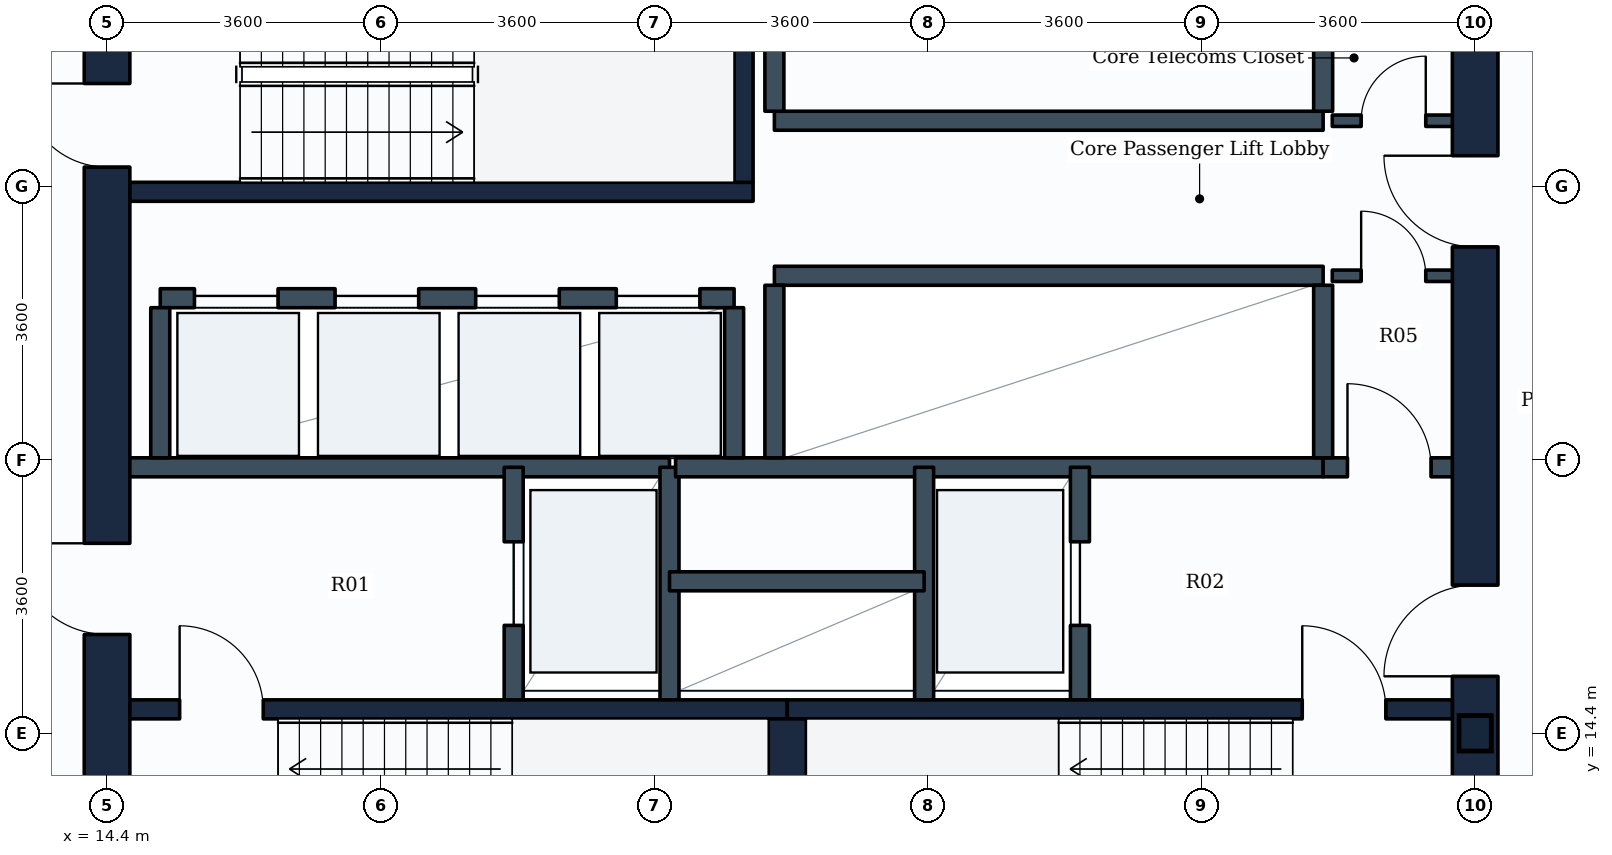
"""IFC4 building model, lengths in metres.
Left out: names, types, materials, properties, quantities, classifications, styles, units other than length and angle.
Written with IfcOpenShell. Run it as: python <this file> out.ifc"""

import sys

from ifc_helpers import new_model, si_unit, direction, frame, frame_2d, origin, origin_2d, place, context, subcontext, project, spatial, rectangle, i_section, extrude, element, fill, save


model = new_model("IFC4")
c1 = context("Model", 3, precision=1e-05, world=origin(), true_north=direction((0.0, 1.0)))
c2 = subcontext(c1, "Body", "Model", "MODEL_VIEW")
j1 = project(units=[si_unit("LENGTHUNIT", "METRE"), si_unit("PLANEANGLEUNIT", "RADIAN")], contexts=[c1])
p1 = place(None, origin())
s1 = spatial("IfcSite", under=j1, at=p1, CompositionType="ELEMENT")
p2 = place(p1, origin())
s2 = spatial("IfcBuilding", under=s1, at=p2, CompositionType="ELEMENT")
p3 = place(p2, frame((0.0, 0.0, 87.9)))
s3 = spatial("IfcBuildingStorey", under=s2, at=p3, CompositionType="ELEMENT", Elevation=87.9)
p4 = place(p3, frame((32.4, 14.4, 0.0), z_axis=(0.0, 0.0, 1.0), x_axis=(1.0, 0.0, 0.0)))
e1 = element("IfcColumn", 1, at=p4, inside=s3, PredefinedType="COLUMN", context=c2, shape_type="SweptSolid", body=[
    extrude(i_section(OverallWidth=0.424, OverallDepth=0.467, WebThickness=0.033, FlangeThickness=0.053, FilletRadius=0.015, at=origin_2d()), origin(), (0.0, 0.0, 1.0), 3.9),
])
p5 = place(p3, frame((14.4, 10.8, 0.0), z_axis=(0.0, 0.0, 1.0), x_axis=(0.0, 1.0, 0.0)))
e2 = element("IfcWall", 2, at=p5, inside=s3, PredefinedType="SHEAR", context=c2, shape_type="SweptSolid", body=[
    extrude(rectangle(XDim=14.4, YDim=0.6, at=frame_2d((7.2, 0.0))), origin(), (0.0, 0.0, 1.0), 3.65),
])
p6 = place(p5, frame((11.05, 0.0, 0.0)))
e3 = element("IfcOpeningElement", 3, at=p6, cuts=e2, PredefinedType="OPENING", context=c2, shape_type="SweptSolid", body=[
    extrude(rectangle(XDim=1.1, YDim=2.1, at=frame_2d((0.55, 1.05))), frame((0.0, 0.31, 0.0), z_axis=(0.0, -1.0, 0.0), x_axis=(1.0, 0.0, 0.0)), (0.0, 0.0, 1.0), 0.62),
])
p7 = place(p5, frame((4.9, 0.0, 0.0)))
e4 = element("IfcOpeningElement", 4, at=p7, cuts=e2, PredefinedType="OPENING", context=c2, shape_type="SweptSolid", body=[
    extrude(rectangle(XDim=1.2, YDim=2.1, at=frame_2d((0.6, 1.05))), frame((0.0, 0.31, 0.0), z_axis=(0.0, -1.0, 0.0), x_axis=(1.0, 0.0, 0.0)), (0.0, 0.0, 1.0), 0.62),
])
p8 = place(p3, frame((32.4, 10.8, 0.0), z_axis=(0.0, 0.0, 1.0), x_axis=(0.0, 1.0, 0.0)))
e5 = element("IfcWall", 5, at=p8, inside=s3, PredefinedType="SHEAR", context=c2, shape_type="SweptSolid", body=[
    extrude(rectangle(XDim=14.4, YDim=0.6, at=frame_2d((7.2, 0.0))), origin(), (0.0, 0.0, 1.0), 3.65),
])
p9 = place(p8, frame((4.35, 0.0, 0.0)))
e6 = element("IfcOpeningElement", 6, at=p9, cuts=e5, PredefinedType="OPENING", context=c2, shape_type="SweptSolid", body=[
    extrude(rectangle(XDim=1.2, YDim=2.1, at=frame_2d((0.6, 1.05))), frame((0.0, 0.31, 0.0), z_axis=(0.0, -1.0, 0.0), x_axis=(1.0, 0.0, 0.0)), (0.0, 0.0, 1.0), 0.62),
])
p10 = place(p8, frame((10.0, 0.0, 0.0)))
e7 = element("IfcOpeningElement", 7, at=p10, cuts=e5, PredefinedType="OPENING", context=c2, shape_type="SweptSolid", body=[
    extrude(rectangle(XDim=1.2, YDim=2.1, at=frame_2d((0.6, 1.05))), frame((0.0, 0.31, 0.0), z_axis=(0.0, -1.0, 0.0), x_axis=(1.0, 0.0, 0.0)), (0.0, 0.0, 1.0), 0.62),
])
p11 = place(p3, frame((14.7, 14.715, 0.0), z_axis=(0.0, 0.0, 1.0), x_axis=(1.0, 0.0, 0.0)))
e8 = element("IfcWall", 8, at=p11, inside=s3, PredefinedType="SHEAR", context=c2, shape_type="SweptSolid", body=[
    extrude(rectangle(XDim=8.65, YDim=0.25, at=frame_2d((4.325, 0.0))), origin(), (0.0, 0.0, 1.0), 3.65),
])
p12 = place(p11, frame((0.655, 0.0, 0.0)))
e9 = element("IfcOpeningElement", 9, at=p12, cuts=e8, PredefinedType="OPENING", context=c2, shape_type="SweptSolid", body=[
    extrude(rectangle(XDim=1.1, YDim=2.1, at=frame_2d((0.55, 1.05))), frame((0.0, 0.135, 0.0), z_axis=(0.0, -1.0, 0.0), x_axis=(1.0, 0.0, 0.0)), (0.0, 0.0, 1.0), 0.27),
])
p13 = place(p3, frame((23.35, 14.715, 0.0), z_axis=(0.0, 0.0, 1.0), x_axis=(1.0, 0.0, 0.0)))
e10 = element("IfcWall", 10, at=p13, inside=s3, PredefinedType="SHEAR", context=c2, shape_type="SweptSolid", body=[
    extrude(rectangle(XDim=8.75, YDim=0.25, at=frame_2d((4.375, 0.0))), origin(), (0.0, 0.0, 1.0), 3.65),
])
p14 = place(p13, frame((6.775, 0.0, 0.0)))
e11 = element("IfcOpeningElement", 11, at=p14, cuts=e10, PredefinedType="OPENING", context=c2, shape_type="SweptSolid", body=[
    extrude(rectangle(XDim=1.1, YDim=2.1, at=frame_2d((0.55, 1.05))), frame((0.0, 0.135, 0.0), z_axis=(0.0, -1.0, 0.0), x_axis=(1.0, 0.0, 0.0)), (0.0, 0.0, 1.0), 0.27),
])
p15 = place(p3, frame((23.35, 11.75, 0.0), z_axis=(0.0, 0.0, 1.0), x_axis=(0.0, 1.0, 0.0)))
e12 = element("IfcWall", 12, at=p15, inside=s3, PredefinedType="SHEAR", context=c2, shape_type="SweptSolid", body=[
    extrude(rectangle(XDim=2.84, YDim=0.5, at=frame_2d((1.42, 0.0))), origin(), (0.0, 0.0, 1.0), 3.65),
])
p16 = place(p3, frame((14.7, 21.525, 0.0), z_axis=(0.0, 0.0, 1.0), x_axis=(1.0, 0.0, 0.0)))
e13 = element("IfcWall", 13, at=p16, inside=s3, PredefinedType="SHEAR", context=c2, shape_type="SweptSolid", body=[
    extrude(rectangle(XDim=8.2, YDim=0.25, at=frame_2d((4.1, 0.0))), origin(), (0.0, 0.0, 1.0), 3.65),
])
p17 = place(p3, frame((22.775, 21.65, 0.0), z_axis=(0.0, 0.0, 1.0), x_axis=(0.0, 1.0, 0.0)))
e14 = element("IfcWall", 14, at=p17, inside=s3, PredefinedType="SHEAR", context=c2, shape_type="SweptSolid", body=[
    extrude(rectangle(XDim=2.84, YDim=0.25, at=frame_2d((1.42, 0.0))), origin(), (0.0, 0.0, 1.0), 3.65),
])
p18 = place(p3, frame((14.65, 17.9, 0.0), z_axis=(0.0, 0.0, 1.0), x_axis=(1.0, 0.0, 0.0)))
e15 = element("IfcWall", 15, at=p18, inside=s3, PredefinedType="PARTITIONING", context=c2, shape_type="SweptSolid", body=[
    extrude(rectangle(XDim=7.15, YDim=0.25, at=frame_2d((3.575, 0.0))), origin(), (0.0, 0.0, 1.0), 3.635),
])
p19 = place(p3, frame((19.75, 14.84, 0.0), z_axis=(0.0, 0.0, 1.0), x_axis=(0.0, 1.0, 0.0)))
e16 = element("IfcWall", 16, at=p19, inside=s3, PredefinedType="PARTITIONING", context=c2, shape_type="SweptSolid", body=[
    extrude(rectangle(XDim=3.06, YDim=0.25, at=frame_2d((1.53, 0.0))), origin(), (0.0, 0.0, 1.0), 3.635),
])
p20 = place(p19, frame((0.98, 0.0, 0.0)))
e17 = element("IfcOpeningElement", 17, at=p20, cuts=e16, PredefinedType="OPENING", context=c2, shape_type="SweptSolid", body=[
    extrude(rectangle(XDim=1.1, YDim=2.1, at=frame_2d((0.55, 1.05))), frame((0.0, 0.135, 0.0), z_axis=(0.0, -1.0, 0.0), x_axis=(1.0, 0.0, 0.0)), (0.0, 0.0, 1.0), 0.27),
])
p21 = place(p3, frame((21.8, 14.84, 0.0), z_axis=(0.0, 0.0, 1.0), x_axis=(0.0, 1.0, 0.0)))
e18 = element("IfcWall", 18, at=p21, inside=s3, PredefinedType="PARTITIONING", context=c2, shape_type="SweptSolid", body=[
    extrude(rectangle(XDim=3.06, YDim=0.25, at=frame_2d((1.53, 0.0))), origin(), (0.0, 0.0, 1.0), 3.635),
])
p22 = place(p3, frame((21.88, 17.9, 0.0), z_axis=(0.0, 0.0, 1.0), x_axis=(1.0, 0.0, 0.0)))
e19 = element("IfcWall", 19, at=p22, inside=s3, PredefinedType="PARTITIONING", context=c2, shape_type="SweptSolid", body=[
    extrude(rectangle(XDim=8.52, YDim=0.25, at=frame_2d((4.26, 0.0))), origin(), (0.0, 0.0, 1.0), 3.635),
])
p23 = place(p3, frame((30.4, 17.9, 0.0), z_axis=(0.0, 0.0, 1.0), x_axis=(1.0, 0.0, 0.0)))
e20 = element("IfcWall", 20, at=p23, inside=s3, PredefinedType="PARTITIONING", context=c2, shape_type="SweptSolid", body=[
    extrude(rectangle(XDim=1.75, YDim=0.25, at=frame_2d((0.875, 0.0))), origin(), (0.0, 0.0, 1.0), 3.635),
])
p24 = place(p23, frame((0.32, 0.0, 0.0)))
e21 = element("IfcOpeningElement", 21, at=p24, cuts=e20, PredefinedType="OPENING", context=c2, shape_type="SweptSolid", body=[
    extrude(rectangle(XDim=1.1, YDim=2.1, at=frame_2d((0.55, 1.05))), frame((0.0, 0.135, 0.0), z_axis=(0.0, -1.0, 0.0), x_axis=(1.0, 0.0, 0.0)), (0.0, 0.0, 1.0), 0.27),
])
p25 = place(p3, frame((25.15, 14.84, 0.0), z_axis=(0.0, 0.0, 1.0), x_axis=(0.0, 1.0, 0.0)))
e22 = element("IfcWall", 22, at=p25, inside=s3, PredefinedType="PARTITIONING", context=c2, shape_type="SweptSolid", body=[
    extrude(rectangle(XDim=3.06, YDim=0.25, at=frame_2d((1.53, 0.0))), origin(), (0.0, 0.0, 1.0), 3.635),
])
p26 = place(p3, frame((27.2, 14.84, 0.0), z_axis=(0.0, 0.0, 1.0), x_axis=(0.0, 1.0, 0.0)))
e23 = element("IfcWall", 23, at=p26, inside=s3, PredefinedType="PARTITIONING", context=c2, shape_type="SweptSolid", body=[
    extrude(rectangle(XDim=3.06, YDim=0.25, at=frame_2d((1.53, 0.0))), origin(), (0.0, 0.0, 1.0), 3.635),
])
p27 = place(p26, frame((0.98, 0.0, 0.0)))
e24 = element("IfcOpeningElement", 24, at=p27, cuts=e23, PredefinedType="OPENING", context=c2, shape_type="SweptSolid", body=[
    extrude(rectangle(XDim=1.1, YDim=2.1, at=frame_2d((0.55, 1.05))), frame((0.0, 0.135, 0.0), z_axis=(0.0, -1.0, 0.0), x_axis=(1.0, 0.0, 0.0)), (0.0, 0.0, 1.0), 0.27),
])
p28 = place(p3, frame((21.8, 16.4, 0.0), z_axis=(0.0, 0.0, 1.0), x_axis=(1.0, 0.0, 0.0)))
e25 = element("IfcWall", 25, at=p28, inside=s3, PredefinedType="PARTITIONING", context=c2, shape_type="SweptSolid", body=[
    extrude(rectangle(XDim=3.35, YDim=0.25, at=frame_2d((1.675, 0.0))), origin(), (0.0, 0.0, 1.0), 3.635),
])
p29 = place(p3, frame((15.1, 20.125, 0.0), z_axis=(0.0, 0.0, 1.0), x_axis=(1.0, 0.0, 0.0)))
e26 = element("IfcWall", 26, at=p29, inside=s3, PredefinedType="PARTITIONING", context=c2, shape_type="SweptSolid", body=[
    extrude(rectangle(XDim=7.55, YDim=0.25, at=frame_2d((3.775, 0.0))), origin(), (0.0, 0.0, 1.0), 3.635),
])
p30 = place(p29, frame((0.45, 0.0, 0.0)))
e27 = element("IfcOpeningElement", 27, at=p30, cuts=e26, PredefinedType="OPENING", context=c2, shape_type="SweptSolid", body=[
    extrude(rectangle(XDim=1.1, YDim=2.1, at=frame_2d((0.55, 1.05))), frame((0.0, 0.135, 0.0), z_axis=(0.0, -1.0, 0.0), x_axis=(1.0, 0.0, 0.0)), (0.0, 0.0, 1.0), 0.27),
])
p31 = place(p29, frame((2.3, 0.0, 0.0)))
e28 = element("IfcOpeningElement", 28, at=p31, cuts=e26, PredefinedType="OPENING", context=c2, shape_type="SweptSolid", body=[
    extrude(rectangle(XDim=1.1, YDim=2.1, at=frame_2d((0.55, 1.05))), frame((0.0, 0.135, 0.0), z_axis=(0.0, -1.0, 0.0), x_axis=(1.0, 0.0, 0.0)), (0.0, 0.0, 1.0), 0.27),
])
p32 = place(p29, frame((4.15, 0.0, 0.0)))
e29 = element("IfcOpeningElement", 29, at=p32, cuts=e26, PredefinedType="OPENING", context=c2, shape_type="SweptSolid", body=[
    extrude(rectangle(XDim=1.1, YDim=2.1, at=frame_2d((0.55, 1.05))), frame((0.0, 0.135, 0.0), z_axis=(0.0, -1.0, 0.0), x_axis=(1.0, 0.0, 0.0)), (0.0, 0.0, 1.0), 0.27),
])
p33 = place(p29, frame((6.0, 0.0, 0.0)))
e30 = element("IfcOpeningElement", 30, at=p33, cuts=e26, PredefinedType="OPENING", context=c2, shape_type="SweptSolid", body=[
    extrude(rectangle(XDim=1.1, YDim=2.1, at=frame_2d((0.55, 1.05))), frame((0.0, 0.135, 0.0), z_axis=(0.0, -1.0, 0.0), x_axis=(1.0, 0.0, 0.0)), (0.0, 0.0, 1.0), 0.27),
])
for number, where, z_axis, x_axis in (
    (31, (15.1, 18.025, 0.0), (0.0, 0.0, 1.0), (0.0, 1.0, 0.0)),
    (32, (22.65, 18.025, 0.0), (0.0, 0.0, 1.0), (0.0, 1.0, 0.0)),
):
    element("IfcWall", number, at=place(p3, frame(where, z_axis=z_axis, x_axis=x_axis)), inside=s3, PredefinedType="PARTITIONING", context=c2, shape_type="SweptSolid", body=[
        extrude(rectangle(XDim=1.975, YDim=0.25, at=frame_2d((0.988, 0.0))), origin(), (0.0, 0.0, 1.0), 3.635),
    ])
p34 = place(p3, frame((23.18, 20.42, 0.0), z_axis=(0.0, 0.0, 1.0), x_axis=(1.0, 0.0, 0.0)))
e33 = element("IfcWall", 33, at=p34, inside=s3, PredefinedType="PARTITIONING", context=c2, shape_type="SweptSolid", body=[
    extrude(rectangle(XDim=7.22, YDim=0.25, at=frame_2d((3.61, 0.0))), origin(), (0.0, 0.0, 1.0), 3.635),
])
for number, where, z_axis, x_axis in (
    (34, (23.18, 18.025, 0.0), (0.0, 0.0, 1.0), (0.0, 1.0, 0.0)),
    (35, (30.4, 18.025, 0.0), (0.0, 0.0, 1.0), (0.0, 1.0, 0.0)),
):
    element("IfcWall", number, at=place(p3, frame(where, z_axis=z_axis, x_axis=x_axis)), inside=s3, PredefinedType="PARTITIONING", context=c2, shape_type="SweptSolid", body=[
        extrude(rectangle(XDim=2.27, YDim=0.25, at=frame_2d((1.135, 0.0))), origin(), (0.0, 0.0, 1.0), 3.635),
    ])
p35 = place(p3, frame((23.18, 22.46, 0.0), z_axis=(0.0, 0.0, 1.0), x_axis=(1.0, 0.0, 0.0)))
e36 = element("IfcWall", 36, at=p35, inside=s3, PredefinedType="PARTITIONING", context=c2, shape_type="SweptSolid", body=[
    extrude(rectangle(XDim=7.22, YDim=0.25, at=frame_2d((3.61, 0.0))), origin(), (0.0, 0.0, 1.0), 3.635),
])
for number, where, z_axis, x_axis in (
    (37, (23.18, 22.585, 0.0), (0.0, 0.0, 1.0), (0.0, 1.0, 0.0)),
    (38, (30.4, 22.585, 0.0), (0.0, 0.0, 1.0), (0.0, 1.0, 0.0)),
):
    element("IfcWall", number, at=place(p3, frame(where, z_axis=z_axis, x_axis=x_axis)), inside=s3, PredefinedType="PARTITIONING", context=c2, shape_type="SweptSolid", body=[
        extrude(rectangle(XDim=2.315, YDim=0.25, at=frame_2d((1.157, 0.0))), origin(), (0.0, 0.0, 1.0), 3.635),
    ])
p36 = place(p3, frame((30.52, 22.46, 0.0), z_axis=(0.0, 0.0, 1.0), x_axis=(1.0, 0.0, 0.0)))
e39 = element("IfcWall", 39, at=p36, inside=s3, PredefinedType="PARTITIONING", context=c2, shape_type="SweptSolid", body=[
    extrude(rectangle(XDim=1.63, YDim=0.15, at=frame_2d((0.815, 0.0))), origin(), (0.0, 0.0, 1.0), 3.635),
])
p37 = place(p36, frame((0.38, 0.0, 0.0)))
e40 = element("IfcOpeningElement", 40, at=p37, cuts=e39, PredefinedType="OPENING", context=c2, shape_type="SweptSolid", body=[
    extrude(rectangle(XDim=0.85, YDim=2.1, at=frame_2d((0.425, 1.05))), frame((0.0, 0.085, 0.0), z_axis=(0.0, -1.0, 0.0), x_axis=(1.0, 0.0, 0.0)), (0.0, 0.0, 1.0), 0.17),
])
p38 = place(p3, frame((30.52, 20.42, 0.0), z_axis=(0.0, 0.0, 1.0), x_axis=(1.0, 0.0, 0.0)))
e41 = element("IfcWall", 41, at=p38, inside=s3, PredefinedType="PARTITIONING", context=c2, shape_type="SweptSolid", body=[
    extrude(rectangle(XDim=1.63, YDim=0.15, at=frame_2d((0.815, 0.0))), origin(), (0.0, 0.0, 1.0), 3.635),
])
p39 = place(p38, frame((0.38, 0.0, 0.0)))
e42 = element("IfcOpeningElement", 42, at=p39, cuts=e41, PredefinedType="OPENING", context=c2, shape_type="SweptSolid", body=[
    extrude(rectangle(XDim=0.85, YDim=2.1, at=frame_2d((0.425, 1.05))), frame((0.0, 0.085, 0.0), z_axis=(0.0, -1.0, 0.0), x_axis=(1.0, 0.0, 0.0)), (0.0, 0.0, 1.0), 0.17),
])
p40 = place(p12, origin())
e43 = element("IfcDoor", 43, at=p40, inside=s3, OperationType="SINGLE_SWING_LEFT", PredefinedType="DOOR", context=c2, shape_type="SweptSolid", body=[
    extrude(rectangle(XDim=1.1, YDim=2.1, at=frame_2d((0.55, 1.05))), frame((0.0, 0.025, 0.0), z_axis=(0.0, -1.0, 0.0), x_axis=(1.0, 0.0, 0.0)), (0.0, 0.0, 1.0), 0.05),
])
fill(e9, e43)
p41 = place(p14, origin())
e44 = element("IfcDoor", 44, at=p41, inside=s3, OperationType="SINGLE_SWING_LEFT", PredefinedType="DOOR", context=c2, shape_type="SweptSolid", body=[
    extrude(rectangle(XDim=1.1, YDim=2.1, at=frame_2d((0.55, 1.05))), frame((0.0, 0.025, 0.0), z_axis=(0.0, -1.0, 0.0), x_axis=(1.0, 0.0, 0.0)), (0.0, 0.0, 1.0), 0.05),
])
fill(e11, e44)
p42 = place(p6, origin())
e45 = element("IfcDoor", 45, at=p42, inside=s3, OperationType="SINGLE_SWING_RIGHT", PredefinedType="DOOR", context=c2, shape_type="SweptSolid", body=[
    extrude(rectangle(XDim=1.1, YDim=2.1, at=frame_2d((0.55, 1.05))), frame((0.0, 0.025, 0.0), z_axis=(0.0, -1.0, 0.0), x_axis=(1.0, 0.0, 0.0)), (0.0, 0.0, 1.0), 0.05),
])
fill(e3, e45)
p43 = place(p20, origin())
e46 = element("IfcDoor", 46, at=p43, inside=s3, OperationType="SLIDING_TO_LEFT", PredefinedType="DOOR", context=c2, shape_type="SweptSolid", body=[
    extrude(rectangle(XDim=1.1, YDim=2.1, at=frame_2d((0.55, 1.05))), frame((0.0, 0.025, 0.0), z_axis=(0.0, -1.0, 0.0), x_axis=(1.0, 0.0, 0.0)), (0.0, 0.0, 1.0), 0.05),
])
fill(e17, e46)
p44 = place(p27, origin())
e47 = element("IfcDoor", 47, at=p44, inside=s3, OperationType="SLIDING_TO_LEFT", PredefinedType="DOOR", context=c2, shape_type="SweptSolid", body=[
    extrude(rectangle(XDim=1.1, YDim=2.1, at=frame_2d((0.55, 1.05))), frame((0.0, 0.025, 0.0), z_axis=(0.0, -1.0, 0.0), x_axis=(1.0, 0.0, 0.0)), (0.0, 0.0, 1.0), 0.05),
])
fill(e24, e47)
p45 = place(p7, origin())
e48 = element("IfcDoor", 48, at=p45, inside=s3, OperationType="SINGLE_SWING_RIGHT", PredefinedType="DOOR", context=c2, shape_type="SweptSolid", body=[
    extrude(rectangle(XDim=1.2, YDim=2.1, at=frame_2d((0.6, 1.05))), frame((0.0, 0.025, 0.0), z_axis=(0.0, -1.0, 0.0), x_axis=(1.0, 0.0, 0.0)), (0.0, 0.0, 1.0), 0.05),
])
fill(e4, e48)
p46 = place(p9, origin())
e49 = element("IfcDoor", 49, at=p46, inside=s3, OperationType="SINGLE_SWING_LEFT", PredefinedType="DOOR", context=c2, shape_type="SweptSolid", body=[
    extrude(rectangle(XDim=1.2, YDim=2.1, at=frame_2d((0.6, 1.05))), frame((0.0, 0.025, 0.0), z_axis=(0.0, -1.0, 0.0), x_axis=(1.0, 0.0, 0.0)), (0.0, 0.0, 1.0), 0.05),
])
fill(e6, e49)
p47 = place(p24, origin())
e50 = element("IfcDoor", 50, at=p47, inside=s3, OperationType="SINGLE_SWING_LEFT", PredefinedType="DOOR", context=c2, shape_type="SweptSolid", body=[
    extrude(rectangle(XDim=1.1, YDim=2.1, at=frame_2d((0.55, 1.05))), frame((0.0, 0.025, 0.0), z_axis=(0.0, -1.0, 0.0), x_axis=(1.0, 0.0, 0.0)), (0.0, 0.0, 1.0), 0.05),
])
fill(e21, e50)
p48 = place(p30, origin())
e51 = element("IfcDoor", 51, at=p48, inside=s3, OperationType="SLIDING_TO_LEFT", PredefinedType="DOOR", context=c2, shape_type="SweptSolid", body=[
    extrude(rectangle(XDim=1.1, YDim=2.1, at=frame_2d((0.55, 1.05))), frame((0.0, 0.025, 0.0), z_axis=(0.0, -1.0, 0.0), x_axis=(1.0, 0.0, 0.0)), (0.0, 0.0, 1.0), 0.05),
])
fill(e27, e51)
p49 = place(p31, origin())
e52 = element("IfcDoor", 52, at=p49, inside=s3, OperationType="SLIDING_TO_LEFT", PredefinedType="DOOR", context=c2, shape_type="SweptSolid", body=[
    extrude(rectangle(XDim=1.1, YDim=2.1, at=frame_2d((0.55, 1.05))), frame((0.0, 0.025, 0.0), z_axis=(0.0, -1.0, 0.0), x_axis=(1.0, 0.0, 0.0)), (0.0, 0.0, 1.0), 0.05),
])
fill(e28, e52)
p50 = place(p32, origin())
e53 = element("IfcDoor", 53, at=p50, inside=s3, OperationType="SLIDING_TO_LEFT", PredefinedType="DOOR", context=c2, shape_type="SweptSolid", body=[
    extrude(rectangle(XDim=1.1, YDim=2.1, at=frame_2d((0.55, 1.05))), frame((0.0, 0.025, 0.0), z_axis=(0.0, -1.0, 0.0), x_axis=(1.0, 0.0, 0.0)), (0.0, 0.0, 1.0), 0.05),
])
fill(e29, e53)
p51 = place(p33, origin())
e54 = element("IfcDoor", 54, at=p51, inside=s3, OperationType="SLIDING_TO_LEFT", PredefinedType="DOOR", context=c2, shape_type="SweptSolid", body=[
    extrude(rectangle(XDim=1.1, YDim=2.1, at=frame_2d((0.55, 1.05))), frame((0.0, 0.025, 0.0), z_axis=(0.0, -1.0, 0.0), x_axis=(1.0, 0.0, 0.0)), (0.0, 0.0, 1.0), 0.05),
])
fill(e30, e54)
p52 = place(p10, origin())
e55 = element("IfcDoor", 55, at=p52, inside=s3, OperationType="SINGLE_SWING_RIGHT", PredefinedType="DOOR", context=c2, shape_type="SweptSolid", body=[
    extrude(rectangle(XDim=1.2, YDim=2.1, at=frame_2d((0.6, 1.05))), frame((0.0, 0.025, 0.0), z_axis=(0.0, -1.0, 0.0), x_axis=(1.0, 0.0, 0.0)), (0.0, 0.0, 1.0), 0.05),
])
fill(e7, e55)
p53 = place(p37, origin())
e56 = element("IfcDoor", 56, at=p53, inside=s3, OperationType="SINGLE_SWING_RIGHT", PredefinedType="DOOR", context=c2, shape_type="SweptSolid", body=[
    extrude(rectangle(XDim=0.85, YDim=2.1, at=frame_2d((0.425, 1.05))), frame((0.0, 0.025, 0.0), z_axis=(0.0, -1.0, 0.0), x_axis=(1.0, 0.0, 0.0)), (0.0, 0.0, 1.0), 0.05),
])
fill(e40, e56)
p54 = place(p39, origin())
e57 = element("IfcDoor", 57, at=p54, inside=s3, OperationType="SINGLE_SWING_LEFT", PredefinedType="DOOR", context=c2, shape_type="SweptSolid", body=[
    extrude(rectangle(XDim=0.85, YDim=2.1, at=frame_2d((0.425, 1.05))), frame((0.0, 0.025, 0.0), z_axis=(0.0, -1.0, 0.0), x_axis=(1.0, 0.0, 0.0)), (0.0, 0.0, 1.0), 0.05),
])
fill(e42, e57)
save(model, sys.argv[1])
